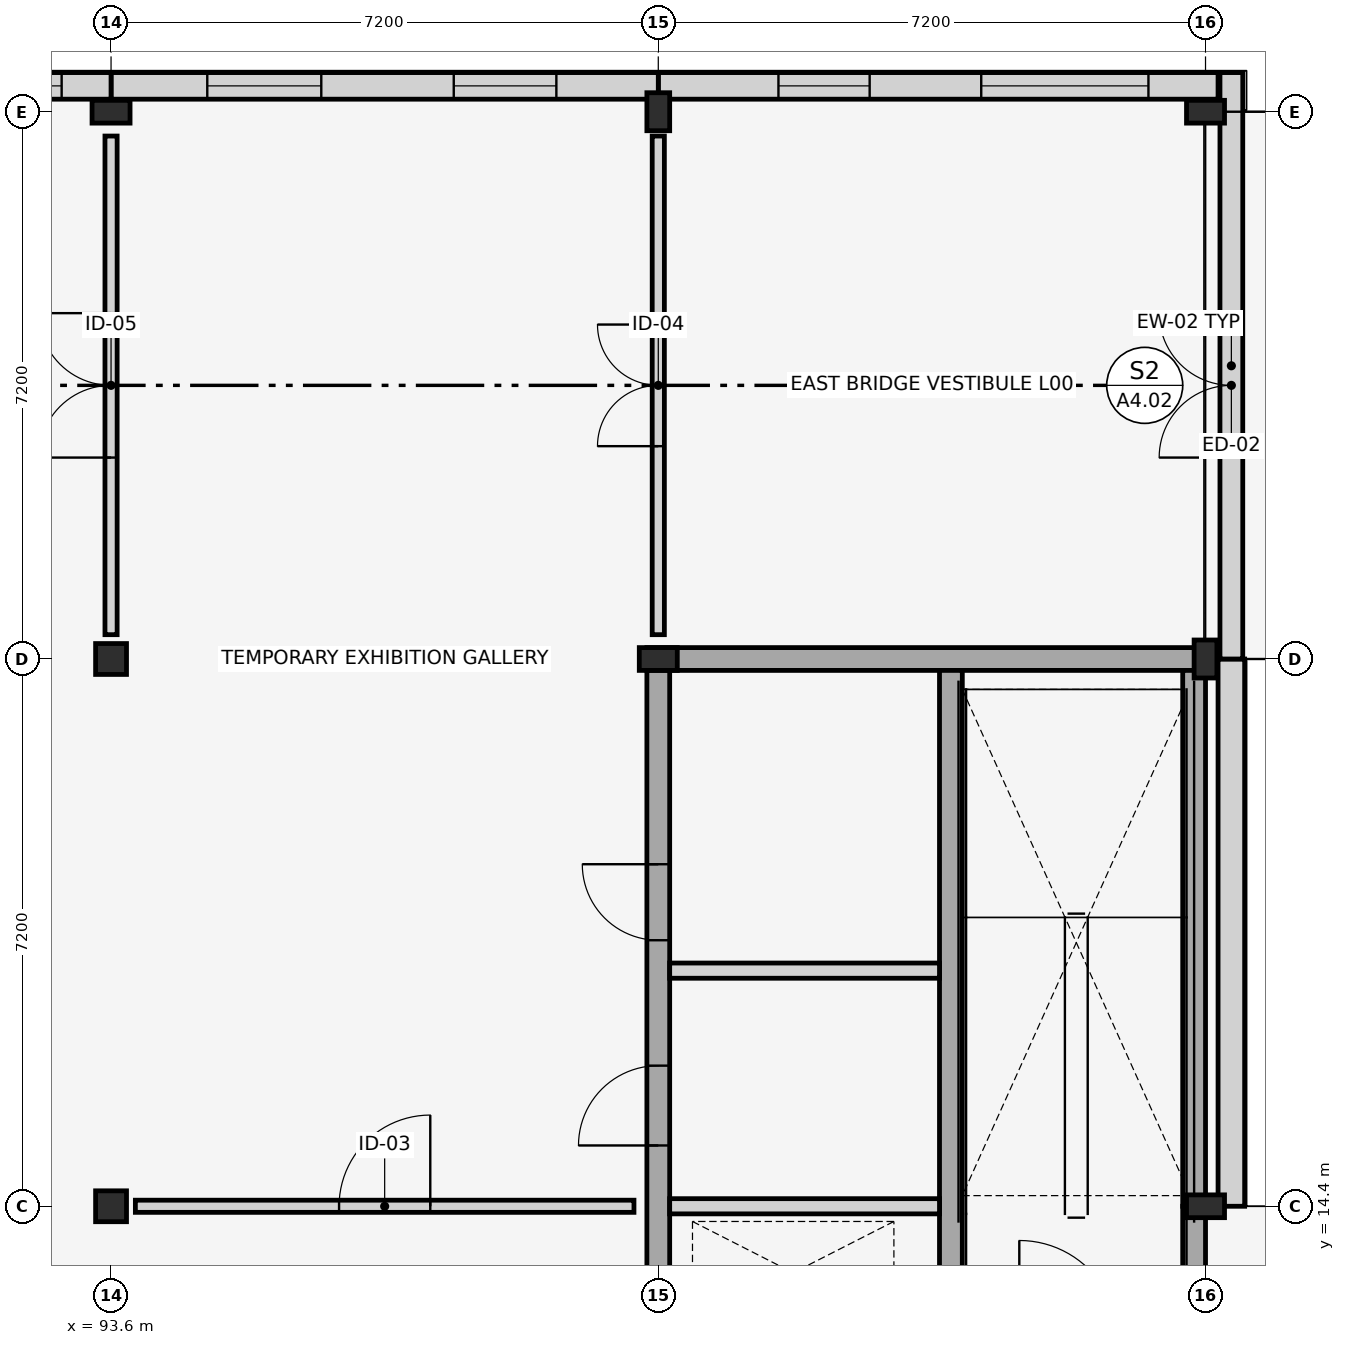
"""IFC4 building model, lengths in metres.
Left out: names, types, materials, properties, quantities, classifications, styles, units other than length and angle.
Written with IfcOpenShell. Run it as: python <this file> out.ifc"""

import sys

from ifc_helpers import new_model, si_unit, direction, frame, frame_2d, origin, origin_2d, place, context, subcontext, project, spatial, rectangle, hollow_circle, i_section, extrude, element, fill, save


model = new_model("IFC4")
c1 = context("Model", 3, precision=1e-05, world=origin(), true_north=direction((0.0, 1.0)))
c2 = subcontext(c1, "Body", "Model", "MODEL_VIEW")
j1 = project(units=[si_unit("LENGTHUNIT", "METRE"), si_unit("PLANEANGLEUNIT", "RADIAN")], contexts=[c1])
p1 = place(None, origin())
s1 = spatial("IfcSite", under=j1, at=p1, CompositionType="ELEMENT")
p2 = place(p1, origin())
s2 = spatial("IfcBuilding", under=s1, at=p2, CompositionType="ELEMENT")
p3 = place(p2, origin())
s3 = spatial("IfcBuildingStorey", under=s2, at=p3, CompositionType="ELEMENT", Elevation=0.0)
for number, where, z_axis, x_axis in (
    (1, (93.6, 14.4, 0.0), (0.0, 0.0, 1.0), (0.0, 1.0, 0.0)),
    (2, (93.6, 21.6, 0.0), (0.0, 0.0, 1.0), (1.0, 0.0, 0.0)),
):
    element("IfcColumn", number, at=place(p3, frame(where, z_axis=z_axis, x_axis=x_axis)), inside=s3, PredefinedType="COLUMN", context=c2, shape_type="SweptSolid", body=[
        extrude(hollow_circle(Radius=0.203, WallThickness=0.016, at=origin_2d()), origin(), (0.0, 0.0, 1.0), 4.5),
    ])
for number, where, z_axis, x_axis in (
    (3, (93.6, 28.8, 0.0), (0.0, 0.0, 1.0), (0.0, 1.0, 0.0)),
    (4, (100.8, 21.6, 0.0), (0.0, 0.0, 1.0), (0.0, 1.0, 0.0)),
    (5, (100.8, 28.8, 0.0), (0.0, 0.0, 1.0), (1.0, 0.0, 0.0)),
    (6, (108.0, 14.4, 0.0), (0.0, 0.0, 1.0), (0.0, 1.0, 0.0)),
    (7, (108.0, 21.6, 0.0), (0.0, 0.0, 1.0), (1.0, 0.0, 0.0)),
    (8, (108.0, 28.8, 0.0), (0.0, 0.0, 1.0), (0.0, 1.0, 0.0)),
):
    element("IfcColumn", number, at=place(p3, frame(where, z_axis=z_axis, x_axis=x_axis)), inside=s3, PredefinedType="COLUMN", context=c2, shape_type="SweptSolid", body=[
        extrude(i_section(OverallWidth=0.3, OverallDepth=0.5, WebThickness=0.014, FlangeThickness=0.028, FilletRadius=0.027, at=origin_2d()), origin(), (0.0, 0.0, 1.0), 4.5),
    ])
p4 = place(p3, frame((108.34, 14.4, 0.0), z_axis=(0.0, 0.0, 1.0), x_axis=(0.0, 1.0, 0.0)))
e9 = element("IfcWall", 9, at=p4, inside=s3, PredefinedType="STANDARD", context=c2, shape_type="SweptSolid", body=[
    extrude(rectangle(XDim=7.2, YDim=0.35, at=frame_2d((3.6, 0.0))), origin(), (0.0, 0.0, 1.0), 4.5),
])
p5 = place(p3, frame((108.34, 21.6, 0.0), z_axis=(0.0, 0.0, 1.0), x_axis=(0.0, 1.0, 0.0)))
e10 = element("IfcWall", 10, at=p5, inside=s3, PredefinedType="STANDARD", context=c2, shape_type="SweptSolid", body=[
    extrude(rectangle(XDim=7.715, YDim=0.3, at=frame_2d((3.857, 0.0))), origin(), (0.0, 0.0, 1.0), 3.95),
])
p6 = place(p5, frame((2.65, 0.0, 0.0)))
e11 = element("IfcOpeningElement", 11, at=p6, cuts=e10, PredefinedType="OPENING", context=c2, shape_type="SweptSolid", body=[
    extrude(rectangle(XDim=1.9, YDim=2.45, at=frame_2d((0.95, 1.225))), frame((0.0, 0.16, 0.0), z_axis=(0.0, -1.0, 0.0), x_axis=(1.0, 0.0, 0.0)), (0.0, 0.0, 1.0), 0.32),
])
p7 = place(p3, frame((108.165, 29.14, 0.0), z_axis=(0.0, 0.0, 1.0), x_axis=(-1.0, 0.0, 0.0)))
e12 = element("IfcWall", 12, at=p7, inside=s3, PredefinedType="STANDARD", context=c2, shape_type="SweptSolid", body=[
    extrude(rectangle(XDim=7.365, YDim=0.35, at=frame_2d((3.683, 0.0))), origin(), (0.0, 0.0, 1.0), 4.5),
])
p8 = place(p7, frame((0.916, 0.0, 0.9)))
e13 = element("IfcOpeningElement", 13, at=p8, cuts=e12, PredefinedType="OPENING", context=c2, shape_type="SweptSolid", body=[
    extrude(rectangle(XDim=2.2, YDim=2.1, at=frame_2d((1.1, 1.05))), frame((0.0, 0.185, 0.0), z_axis=(0.0, -1.0, 0.0), x_axis=(1.0, 0.0, 0.0)), (0.0, 0.0, 1.0), 0.37),
])
p9 = place(p7, frame((4.584, 0.0, 0.9)))
e14 = element("IfcOpeningElement", 14, at=p9, cuts=e12, PredefinedType="OPENING", context=c2, shape_type="SweptSolid", body=[
    extrude(rectangle(XDim=1.2, YDim=2.2, at=frame_2d((0.6, 1.1))), frame((0.0, 0.185, 0.0), z_axis=(0.0, -1.0, 0.0), x_axis=(1.0, 0.0, 0.0)), (0.0, 0.0, 1.0), 0.37),
])
p10 = place(p3, frame((100.8, 29.14, 0.0), z_axis=(0.0, 0.0, 1.0), x_axis=(-1.0, 0.0, 0.0)))
e15 = element("IfcWall", 15, at=p10, inside=s3, PredefinedType="STANDARD", context=c2, shape_type="SweptSolid", body=[
    extrude(rectangle(XDim=7.2, YDim=0.35, at=frame_2d((3.6, 0.0))), origin(), (0.0, 0.0, 1.0), 4.5),
])
p11 = place(p10, frame((1.341, 0.0, 0.9)))
e16 = element("IfcOpeningElement", 16, at=p11, cuts=e15, PredefinedType="OPENING", context=c2, shape_type="SweptSolid", body=[
    extrude(rectangle(XDim=1.35, YDim=2.2, at=frame_2d((0.675, 1.1))), frame((0.0, 0.185, 0.0), z_axis=(0.0, -1.0, 0.0), x_axis=(1.0, 0.0, 0.0)), (0.0, 0.0, 1.0), 0.37),
])
p12 = place(p10, frame((4.434, 0.0, 0.9)))
e17 = element("IfcOpeningElement", 17, at=p12, cuts=e15, PredefinedType="OPENING", context=c2, shape_type="SweptSolid", body=[
    extrude(rectangle(XDim=1.5, YDim=2.4, at=frame_2d((0.75, 1.2))), frame((0.0, 0.185, 0.0), z_axis=(0.0, -1.0, 0.0), x_axis=(1.0, 0.0, 0.0)), (0.0, 0.0, 1.0), 0.37),
])
p13 = place(p3, frame((93.6, 29.14, 0.0), z_axis=(0.0, 0.0, 1.0), x_axis=(-1.0, 0.0, 0.0)))
e18 = element("IfcWall", 18, at=p13, inside=s3, PredefinedType="STANDARD", context=c2, shape_type="SweptSolid", body=[
    extrude(rectangle(XDim=7.2, YDim=0.35, at=frame_2d((3.6, 0.0))), origin(), (0.0, 0.0, 1.0), 4.5),
])
p14 = place(p13, frame((2.65, 0.0, 0.0)))
e19 = element("IfcOpeningElement", 19, at=p14, cuts=e18, PredefinedType="OPENING", context=c2, shape_type="SweptSolid", body=[
    extrude(rectangle(XDim=1.9, YDim=2.45, at=frame_2d((0.95, 1.225))), frame((0.0, 0.185, 0.0), z_axis=(0.0, -1.0, 0.0), x_axis=(1.0, 0.0, 0.0)), (0.0, 0.0, 1.0), 0.37),
])
p15 = place(p13, frame((2.55, 0.0, 2.6)))
e20 = element("IfcOpeningElement", 20, at=p15, cuts=e18, PredefinedType="OPENING", context=c2, shape_type="SweptSolid", body=[
    extrude(rectangle(XDim=2.1, YDim=1.15, at=frame_2d((1.05, 0.575))), frame((0.0, 0.185, 0.0), z_axis=(0.0, -1.0, 0.0), x_axis=(1.0, 0.0, 0.0)), (0.0, 0.0, 1.0), 0.37),
])
p16 = place(p13, frame((0.65, 0.0, 0.35)))
e21 = element("IfcOpeningElement", 21, at=p16, cuts=e18, PredefinedType="OPENING", context=c2, shape_type="SweptSolid", body=[
    extrude(rectangle(XDim=1.1, YDim=2.0, at=frame_2d((0.55, 1.0))), frame((0.0, 0.185, 0.0), z_axis=(0.0, -1.0, 0.0), x_axis=(1.0, 0.0, 0.0)), (0.0, 0.0, 1.0), 0.37),
])
p17 = place(p13, frame((5.45, 0.0, 0.35)))
e22 = element("IfcOpeningElement", 22, at=p17, cuts=e18, PredefinedType="OPENING", context=c2, shape_type="SweptSolid", body=[
    extrude(rectangle(XDim=1.1, YDim=2.0, at=frame_2d((0.55, 1.0))), frame((0.0, 0.185, 0.0), z_axis=(0.0, -1.0, 0.0), x_axis=(1.0, 0.0, 0.0)), (0.0, 0.0, 1.0), 0.37),
])
p18 = place(p3, frame((100.65, 21.6, 0.0), z_axis=(0.0, 0.0, 1.0), x_axis=(1.0, 0.0, 0.0)))
e23 = element("IfcWall", 23, at=p18, inside=s3, PredefinedType="SHEAR", context=c2, shape_type="SweptSolid", body=[
    extrude(rectangle(XDim=7.35, YDim=0.3, at=frame_2d((3.675, 0.0))), origin(), (0.0, 0.0, 1.0), 4.28),
])
p19 = place(p3, frame((107.85, 7.35, 0.0), z_axis=(0.0, 0.0, 1.0), x_axis=(0.0, 1.0, 0.0)))
e24 = element("IfcWall", 24, at=p19, inside=s3, PredefinedType="SHEAR", context=c2, shape_type="SweptSolid", body=[
    extrude(rectangle(XDim=7.05, YDim=0.3, at=frame_2d((3.525, 0.0))), origin(), (0.0, 0.0, 1.0), 4.28),
])
p20 = place(p19, frame((3.65, 0.0, 0.0)))
e25 = element("IfcOpeningElement", 25, at=p20, cuts=e24, PredefinedType="OPENING", context=c2, shape_type="SweptSolid", body=[
    extrude(rectangle(XDim=1.1, YDim=2.2, at=frame_2d((0.55, 1.1))), frame((0.0, 0.16, 0.0), z_axis=(0.0, -1.0, 0.0), x_axis=(1.0, 0.0, 0.0)), (0.0, 0.0, 1.0), 0.32),
])
p21 = place(p3, frame((107.85, 14.4, 0.0), z_axis=(0.0, 0.0, 1.0), x_axis=(0.0, 1.0, 0.0)))
e26 = element("IfcWall", 26, at=p21, inside=s3, PredefinedType="SHEAR", context=c2, shape_type="SweptSolid", body=[
    extrude(rectangle(XDim=7.05, YDim=0.3, at=frame_2d((3.525, 0.0))), origin(), (0.0, 0.0, 1.0), 4.28),
])
p22 = place(p3, frame((100.8, 7.35, 0.0), z_axis=(0.0, 0.0, 1.0), x_axis=(0.0, 1.0, 0.0)))
e27 = element("IfcWall", 27, at=p22, inside=s3, PredefinedType="SHEAR", context=c2, shape_type="SweptSolid", body=[
    extrude(rectangle(XDim=14.1, YDim=0.3, at=frame_2d((7.05, 0.0))), origin(), (0.0, 0.0, 1.0), 4.28),
])
p23 = place(p22, frame((3.55, 0.0, 0.0)))
e28 = element("IfcOpeningElement", 28, at=p23, cuts=e27, PredefinedType="OPENING", context=c2, shape_type="SweptSolid", body=[
    extrude(rectangle(XDim=1.3, YDim=2.2, at=frame_2d((0.65, 1.1))), frame((0.0, 0.16, 0.0), z_axis=(0.0, -1.0, 0.0), x_axis=(1.0, 0.0, 0.0)), (0.0, 0.0, 1.0), 0.32),
])
p24 = place(p22, frame((7.85, 0.0, 0.0)))
e29 = element("IfcOpeningElement", 29, at=p24, cuts=e27, PredefinedType="OPENING", context=c2, shape_type="SweptSolid", body=[
    extrude(rectangle(XDim=1.05, YDim=2.15, at=frame_2d((0.525, 1.075))), frame((0.0, 0.16, 0.0), z_axis=(0.0, -1.0, 0.0), x_axis=(1.0, 0.0, 0.0)), (0.0, 0.0, 1.0), 0.32),
])
p25 = place(p22, frame((10.55, 0.0, 0.0)))
e30 = element("IfcOpeningElement", 30, at=p25, cuts=e27, PredefinedType="OPENING", context=c2, shape_type="SweptSolid", body=[
    extrude(rectangle(XDim=1.0, YDim=2.15, at=frame_2d((0.5, 1.075))), frame((0.0, 0.16, 0.0), z_axis=(0.0, -1.0, 0.0), x_axis=(1.0, 0.0, 0.0)), (0.0, 0.0, 1.0), 0.32),
])
p26 = place(p3, frame((104.65, 12.54, 0.0), z_axis=(0.0, 0.0, 1.0), x_axis=(0.0, 1.0, 0.0)))
e31 = element("IfcWall", 31, at=p26, inside=s3, PredefinedType="SHEAR", context=c2, shape_type="SweptSolid", body=[
    extrude(rectangle(XDim=8.91, YDim=0.3, at=frame_2d((4.455, 0.0))), origin(), (0.0, 0.0, 1.0), 4.28),
])
for number, where, z_axis, x_axis in (
    (32, (100.95, 14.4, 0.0), (0.0, 0.0, 1.0), (1.0, 0.0, 0.0)),
    (33, (100.95, 17.5, 0.0), (0.0, 0.0, 1.0), (1.0, 0.0, 0.0)),
):
    element("IfcWall", number, at=place(p3, frame(where, z_axis=z_axis, x_axis=x_axis)), inside=s3, PredefinedType="PLUMBINGWALL", context=c2, shape_type="SweptSolid", body=[
        extrude(rectangle(XDim=3.55, YDim=0.2, at=frame_2d((1.775, 0.0))), origin(), (0.0, 0.0, 1.0), 3.7),
    ])
p27 = place(p3, frame((93.92, 14.4, 0.0), z_axis=(0.0, 0.0, 1.0), x_axis=(1.0, 0.0, 0.0)))
e34 = element("IfcWall", 34, at=p27, inside=s3, PredefinedType="PARTITIONING", context=c2, shape_type="SweptSolid", body=[
    extrude(rectangle(XDim=6.56, YDim=0.16, at=frame_2d((3.28, 0.0))), origin(), (0.0, 0.0, 1.0), 3.45),
])
p28 = place(p27, frame((2.68, 0.0, 0.0)))
e35 = element("IfcOpeningElement", 35, at=p28, cuts=e34, PredefinedType="OPENING", context=c2, shape_type="SweptSolid", body=[
    extrude(rectangle(XDim=1.2, YDim=2.25, at=frame_2d((0.6, 1.125))), frame((0.0, 0.09, 0.0), z_axis=(0.0, -1.0, 0.0), x_axis=(1.0, 0.0, 0.0)), (0.0, 0.0, 1.0), 0.18),
])
p29 = place(p3, frame((100.8, 21.92, 0.0), z_axis=(0.0, 0.0, 1.0), x_axis=(0.0, 1.0, 0.0)))
e36 = element("IfcWall", 36, at=p29, inside=s3, PredefinedType="PARTITIONING", context=c2, shape_type="SweptSolid", body=[
    extrude(rectangle(XDim=6.56, YDim=0.16, at=frame_2d((3.28, 0.0))), origin(), (0.0, 0.0, 1.0), 3.45),
])
p30 = place(p29, frame((2.48, 0.0, 0.0)))
e37 = element("IfcOpeningElement", 37, at=p30, cuts=e36, PredefinedType="OPENING", context=c2, shape_type="SweptSolid", body=[
    extrude(rectangle(XDim=1.6, YDim=2.35, at=frame_2d((0.8, 1.175))), frame((0.0, 0.09, 0.0), z_axis=(0.0, -1.0, 0.0), x_axis=(1.0, 0.0, 0.0)), (0.0, 0.0, 1.0), 0.18),
])
p31 = place(p3, frame((93.6, 21.92, 0.0), z_axis=(0.0, 0.0, 1.0), x_axis=(0.0, 1.0, 0.0)))
e38 = element("IfcWall", 38, at=p31, inside=s3, PredefinedType="PARTITIONING", context=c2, shape_type="SweptSolid", body=[
    extrude(rectangle(XDim=6.56, YDim=0.16, at=frame_2d((3.28, 0.0))), origin(), (0.0, 0.0, 1.0), 3.45),
])
p32 = place(p31, frame((2.33, 0.0, 0.0)))
e39 = element("IfcOpeningElement", 39, at=p32, cuts=e38, PredefinedType="OPENING", context=c2, shape_type="SweptSolid", body=[
    extrude(rectangle(XDim=1.9, YDim=2.45, at=frame_2d((0.95, 1.225))), frame((0.0, 0.09, 0.0), z_axis=(0.0, -1.0, 0.0), x_axis=(1.0, 0.0, 0.0)), (0.0, 0.0, 1.0), 0.18),
])
p33 = place(p6, origin())
e40 = element("IfcDoor", 40, at=p33, inside=s3, OperationType="DOUBLE_DOOR_SINGLE_SWING", PredefinedType="DOOR", context=c2, shape_type="SweptSolid", body=[
    extrude(rectangle(XDim=1.9, YDim=2.45, at=frame_2d((0.95, 1.225))), frame((0.0, 0.025, 0.0), z_axis=(0.0, -1.0, 0.0), x_axis=(1.0, 0.0, 0.0)), (0.0, 0.0, 1.0), 0.05),
])
fill(e11, e40)
p34 = place(p8, origin())
e41 = element("IfcWindow", 41, at=p34, inside=s3, PartitioningType="SINGLE_PANEL", PredefinedType="WINDOW", context=c2, shape_type="SweptSolid", body=[
    extrude(rectangle(XDim=2.2, YDim=2.1, at=frame_2d((1.1, 1.05))), frame((0.0, 0.03, 0.0), z_axis=(0.0, -1.0, 0.0), x_axis=(1.0, 0.0, 0.0)), (0.0, 0.0, 1.0), 0.06),
])
fill(e13, e41)
p35 = place(p9, origin())
e42 = element("IfcWindow", 42, at=p35, inside=s3, PartitioningType="SINGLE_PANEL", PredefinedType="WINDOW", context=c2, shape_type="SweptSolid", body=[
    extrude(rectangle(XDim=1.2, YDim=2.2, at=frame_2d((0.6, 1.1))), frame((0.0, 0.03, 0.0), z_axis=(0.0, -1.0, 0.0), x_axis=(1.0, 0.0, 0.0)), (0.0, 0.0, 1.0), 0.06),
])
fill(e14, e42)
p36 = place(p11, origin())
e43 = element("IfcWindow", 43, at=p36, inside=s3, PartitioningType="SINGLE_PANEL", PredefinedType="WINDOW", context=c2, shape_type="SweptSolid", body=[
    extrude(rectangle(XDim=1.35, YDim=2.2, at=frame_2d((0.675, 1.1))), frame((0.0, 0.03, 0.0), z_axis=(0.0, -1.0, 0.0), x_axis=(1.0, 0.0, 0.0)), (0.0, 0.0, 1.0), 0.06),
])
fill(e16, e43)
p37 = place(p12, origin())
e44 = element("IfcWindow", 44, at=p37, inside=s3, PartitioningType="SINGLE_PANEL", PredefinedType="WINDOW", context=c2, shape_type="SweptSolid", body=[
    extrude(rectangle(XDim=1.5, YDim=2.4, at=frame_2d((0.75, 1.2))), frame((0.0, 0.03, 0.0), z_axis=(0.0, -1.0, 0.0), x_axis=(1.0, 0.0, 0.0)), (0.0, 0.0, 1.0), 0.06),
])
fill(e17, e44)
p38 = place(p16, origin())
e45 = element("IfcWindow", 45, at=p38, inside=s3, PartitioningType="SINGLE_PANEL", PredefinedType="WINDOW", context=c2, shape_type="SweptSolid", body=[
    extrude(rectangle(XDim=1.1, YDim=2.0, at=frame_2d((0.55, 1.0))), frame((0.0, 0.03, 0.0), z_axis=(0.0, -1.0, 0.0), x_axis=(1.0, 0.0, 0.0)), (0.0, 0.0, 1.0), 0.06),
])
fill(e21, e45)
p39 = place(p24, origin())
e46 = element("IfcDoor", 46, at=p39, inside=s3, OperationType="SINGLE_SWING_LEFT", PredefinedType="DOOR", context=c2, shape_type="SweptSolid", body=[
    extrude(rectangle(XDim=1.05, YDim=2.15, at=frame_2d((0.525, 1.075))), frame((0.0, 0.025, 0.0), z_axis=(0.0, -1.0, 0.0), x_axis=(1.0, 0.0, 0.0)), (0.0, 0.0, 1.0), 0.05),
])
fill(e29, e46)
p40 = place(p25, origin())
e47 = element("IfcDoor", 47, at=p40, inside=s3, OperationType="SINGLE_SWING_RIGHT", PredefinedType="DOOR", context=c2, shape_type="SweptSolid", body=[
    extrude(rectangle(XDim=1.0, YDim=2.15, at=frame_2d((0.5, 1.075))), frame((0.0, 0.025, 0.0), z_axis=(0.0, -1.0, 0.0), x_axis=(1.0, 0.0, 0.0)), (0.0, 0.0, 1.0), 0.05),
])
fill(e30, e47)
p41 = place(p28, origin())
e48 = element("IfcDoor", 48, at=p41, inside=s3, OperationType="SINGLE_SWING_RIGHT", PredefinedType="DOOR", context=c2, shape_type="SweptSolid", body=[
    extrude(rectangle(XDim=1.2, YDim=2.25, at=frame_2d((0.6, 1.125))), frame((0.0, 0.025, 0.0), z_axis=(0.0, -1.0, 0.0), x_axis=(1.0, 0.0, 0.0)), (0.0, 0.0, 1.0), 0.05),
])
fill(e35, e48)
p42 = place(p30, origin())
e49 = element("IfcDoor", 49, at=p42, inside=s3, OperationType="DOUBLE_DOOR_SINGLE_SWING", PredefinedType="DOOR", context=c2, shape_type="SweptSolid", body=[
    extrude(rectangle(XDim=1.6, YDim=2.35, at=frame_2d((0.8, 1.175))), frame((0.0, 0.025, 0.0), z_axis=(0.0, -1.0, 0.0), x_axis=(1.0, 0.0, 0.0)), (0.0, 0.0, 1.0), 0.05),
])
fill(e37, e49)
p43 = place(p32, origin())
e50 = element("IfcDoor", 50, at=p43, inside=s3, OperationType="DOUBLE_DOOR_SINGLE_SWING", PredefinedType="DOOR", context=c2, shape_type="SweptSolid", body=[
    extrude(rectangle(XDim=1.9, YDim=2.45, at=frame_2d((0.95, 1.225))), frame((0.0, 0.025, 0.0), z_axis=(0.0, -1.0, 0.0), x_axis=(1.0, 0.0, 0.0)), (0.0, 0.0, 1.0), 0.05),
])
fill(e39, e50)
save(model, sys.argv[1])
